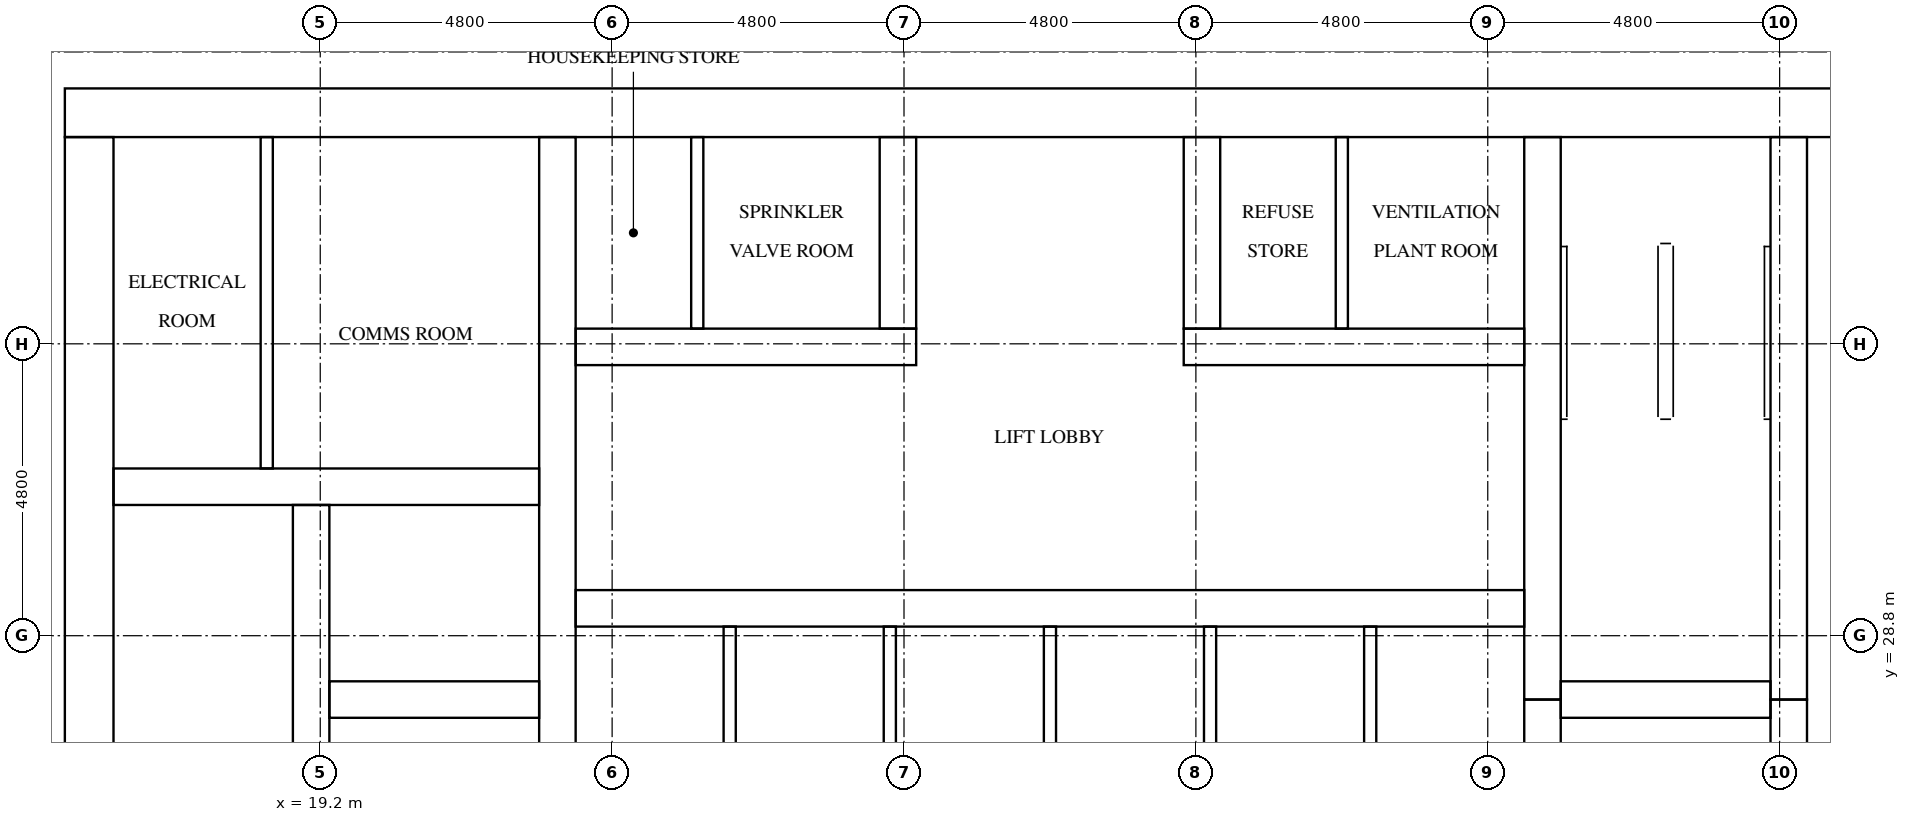
"""IFC4 building model, lengths in metres.
Left out: names, types, materials, properties, quantities, classifications, styles, units other than length and angle.
Written with IfcOpenShell. Run it as: python <this file> out.ifc"""

import sys

from ifc_helpers import new_model, si_unit, direction, frame, frame_2d, origin, place, context, subcontext, project, spatial, rectangle, extrude, element, fill, save


model = new_model("IFC4")
c1 = context("Model", 3, precision=1e-05, world=origin(), true_north=direction((0.0, 1.0)))
c2 = subcontext(c1, "Body", "Model", "MODEL_VIEW")
j1 = project(units=[si_unit("LENGTHUNIT", "METRE"), si_unit("PLANEANGLEUNIT", "RADIAN")], contexts=[c1])
p1 = place(None, origin())
s1 = spatial("IfcSite", under=j1, at=p1, CompositionType="ELEMENT")
p2 = place(p1, origin())
s2 = spatial("IfcBuilding", under=s1, at=p2, CompositionType="ELEMENT")
p3 = place(p2, frame((0.0, 0.0, 156.0)))
s3 = spatial("IfcBuildingStorey", under=s2, at=p3, CompositionType="ELEMENT", Elevation=156.0)
p4 = place(p3, frame((15.0, 37.4, 0.0), z_axis=(0.0, 0.0, 1.0), x_axis=(1.0, 0.0, 0.0)))
e1 = element("IfcWall", 1, at=p4, inside=s3, PredefinedType="SHEAR", context=c2, shape_type="SweptSolid", body=[
    extrude(rectangle(XDim=32.4, YDim=0.8, at=frame_2d((16.2, 0.0))), origin(), (0.0, 0.0, 1.0), 3.2),
])
p5 = place(p4, frame((15.3, 0.0, 0.0)))
e2 = element("IfcOpeningElement", 2, at=p5, cuts=e1, PredefinedType="OPENING", context=c2, shape_type="SweptSolid", body=[
    extrude(rectangle(XDim=1.8, YDim=2.1, at=frame_2d((0.9, 1.05))), frame((0.0, 0.41, 0.0), z_axis=(0.0, -1.0, 0.0), x_axis=(1.0, 0.0, 0.0)), (0.0, 0.0, 1.0), 0.82),
])
p6 = place(p4, frame((1.51, 0.0, 0.0)))
e3 = element("IfcOpeningElement", 3, at=p6, cuts=e1, PredefinedType="OPENING", context=c2, shape_type="SweptSolid", body=[
    extrude(rectangle(XDim=1.0, YDim=2.1, at=frame_2d((0.5, 1.05))), frame((0.0, 0.41, 0.0), z_axis=(0.0, -1.0, 0.0), x_axis=(1.0, 0.0, 0.0)), (0.0, 0.0, 1.0), 0.82),
])
p7 = place(p4, frame((5.11, 0.0, 0.0)))
e4 = element("IfcOpeningElement", 4, at=p7, cuts=e1, PredefinedType="OPENING", context=c2, shape_type="SweptSolid", body=[
    extrude(rectangle(XDim=1.0, YDim=2.1, at=frame_2d((0.5, 1.05))), frame((0.0, 0.41, 0.0), z_axis=(0.0, -1.0, 0.0), x_axis=(1.0, 0.0, 0.0)), (0.0, 0.0, 1.0), 0.82),
])
p8 = place(p3, frame((15.4, 15.8, 0.0), z_axis=(0.0, 0.0, 1.0), x_axis=(0.0, 1.0, 0.0)))
e5 = element("IfcWall", 5, at=p8, inside=s3, PredefinedType="SHEAR", context=c2, shape_type="SweptSolid", body=[
    extrude(rectangle(XDim=21.2, YDim=0.8, at=frame_2d((10.6, 0.0))), origin(), (0.0, 0.0, 1.0), 3.2),
])
p9 = place(p8, frame((4.96, 0.0, 0.0)))
e6 = element("IfcOpeningElement", 6, at=p9, cuts=e5, PredefinedType="OPENING", context=c2, shape_type="SweptSolid", body=[
    extrude(rectangle(XDim=1.2, YDim=2.1, at=frame_2d((0.6, 1.05))), frame((0.0, 0.41, 0.0), z_axis=(0.0, -1.0, 0.0), x_axis=(1.0, 0.0, 0.0)), (0.0, 0.0, 1.0), 0.82),
])
p10 = place(p3, frame((19.05, 15.8, 0.0), z_axis=(0.0, 0.0, 1.0), x_axis=(0.0, 1.0, 0.0)))
e7 = element("IfcWall", 7, at=p10, inside=s3, PredefinedType="SHEAR", context=c2, shape_type="SweptSolid", body=[
    extrude(rectangle(XDim=15.15, YDim=0.6, at=frame_2d((7.575, 0.0))), origin(), (0.0, 0.0, 1.0), 3.2),
])
p11 = place(p10, frame((9.65, 0.0, 0.0)))
e8 = element("IfcOpeningElement", 8, at=p11, cuts=e7, PredefinedType="OPENING", context=c2, shape_type="SweptSolid", body=[
    extrude(rectangle(XDim=1.1, YDim=2.1, at=frame_2d((0.55, 1.05))), frame((0.0, 0.31, 0.0), z_axis=(0.0, -1.0, 0.0), x_axis=(1.0, 0.0, 0.0)), (0.0, 0.0, 1.0), 0.62),
])
p12 = place(p10, frame((13.15, 0.0, 0.0)))
e9 = element("IfcOpeningElement", 9, at=p12, cuts=e7, PredefinedType="OPENING", context=c2, shape_type="SweptSolid", body=[
    extrude(rectangle(XDim=1.1, YDim=2.1, at=frame_2d((0.55, 1.05))), frame((0.0, 0.31, 0.0), z_axis=(0.0, -1.0, 0.0), x_axis=(1.0, 0.0, 0.0)), (0.0, 0.0, 1.0), 0.62),
])
p13 = place(p10, frame((0.4, 0.0, 0.0)))
e10 = element("IfcOpeningElement", 10, at=p13, cuts=e7, PredefinedType="OPENING", context=c2, shape_type="SweptSolid", body=[
    extrude(rectangle(XDim=1.2, YDim=2.1, at=frame_2d((0.6, 1.05))), frame((0.0, 0.31, 0.0), z_axis=(0.0, -1.0, 0.0), x_axis=(1.0, 0.0, 0.0)), (0.0, 0.0, 1.0), 0.62),
])
p14 = place(p3, frame((23.1, 15.8, 0.0), z_axis=(0.0, 0.0, 1.0), x_axis=(0.0, 1.0, 0.0)))
e11 = element("IfcWall", 11, at=p14, inside=s3, PredefinedType="SHEAR", context=c2, shape_type="SweptSolid", body=[
    extrude(rectangle(XDim=21.2, YDim=0.6, at=frame_2d((10.6, 0.0))), origin(), (0.0, 0.0, 1.0), 3.2),
])
p15 = place(p3, frame((39.3, 24.25, 0.0), z_axis=(0.0, 0.0, 1.0), x_axis=(0.0, 1.0, 0.0)))
e12 = element("IfcWall", 12, at=p15, inside=s3, PredefinedType="SHEAR", context=c2, shape_type="SweptSolid", body=[
    extrude(rectangle(XDim=3.5, YDim=0.6, at=frame_2d((1.75, 0.0))), origin(), (0.0, 0.0, 1.0), 3.2),
])
p16 = place(p3, frame((39.3, 27.75, 0.0), z_axis=(0.0, 0.0, 1.0), x_axis=(0.0, 1.0, 0.0)))
e13 = element("IfcWall", 13, at=p16, inside=s3, PredefinedType="SHEAR", context=c2, shape_type="SweptSolid", body=[
    extrude(rectangle(XDim=9.25, YDim=0.6, at=frame_2d((4.625, 0.0))), origin(), (0.0, 0.0, 1.0), 3.2),
])
p17 = place(p3, frame((43.35, 24.25, 0.0), z_axis=(0.0, 0.0, 1.0), x_axis=(0.0, 1.0, 0.0)))
e14 = element("IfcWall", 14, at=p17, inside=s3, PredefinedType="SHEAR", context=c2, shape_type="SweptSolid", body=[
    extrude(rectangle(XDim=3.5, YDim=0.6, at=frame_2d((1.75, 0.0))), origin(), (0.0, 0.0, 1.0), 3.2),
])
p18 = place(p17, frame((1.2, 0.0, 0.0)))
e15 = element("IfcOpeningElement", 15, at=p18, cuts=e14, PredefinedType="OPENING", context=c2, shape_type="SweptSolid", body=[
    extrude(rectangle(XDim=1.1, YDim=2.1, at=frame_2d((0.55, 1.05))), frame((0.0, 0.31, 0.0), z_axis=(0.0, -1.0, 0.0), x_axis=(1.0, 0.0, 0.0)), (0.0, 0.0, 1.0), 0.62),
])
p19 = place(p3, frame((43.35, 27.75, 0.0), z_axis=(0.0, 0.0, 1.0), x_axis=(0.0, 1.0, 0.0)))
e16 = element("IfcWall", 16, at=p19, inside=s3, PredefinedType="SHEAR", context=c2, shape_type="SweptSolid", body=[
    extrude(rectangle(XDim=9.25, YDim=0.6, at=frame_2d((4.625, 0.0))), origin(), (0.0, 0.0, 1.0), 3.2),
])
p20 = place(p19, frame((7.65, 0.0, 0.0)))
e17 = element("IfcOpeningElement", 17, at=p20, cuts=e16, PredefinedType="OPENING", context=c2, shape_type="SweptSolid", body=[
    extrude(rectangle(XDim=1.2, YDim=2.1, at=frame_2d((0.6, 1.05))), frame((0.0, 0.31, 0.0), z_axis=(0.0, -1.0, 0.0), x_axis=(1.0, 0.0, 0.0)), (0.0, 0.0, 1.0), 0.62),
])
p21 = place(p3, frame((19.35, 27.75, 0.0), z_axis=(0.0, 0.0, 1.0), x_axis=(1.0, 0.0, 0.0)))
e18 = element("IfcWall", 18, at=p21, inside=s3, PredefinedType="SHEAR", context=c2, shape_type="SweptSolid", body=[
    extrude(rectangle(XDim=3.45, YDim=0.6, at=frame_2d((1.725, 0.0))), origin(), (0.0, 0.0, 1.0), 3.2),
])
p22 = place(p3, frame((15.8, 31.25, 0.0), z_axis=(0.0, 0.0, 1.0), x_axis=(1.0, 0.0, 0.0)))
e19 = element("IfcWall", 19, at=p22, inside=s3, PredefinedType="SHEAR", context=c2, shape_type="SweptSolid", body=[
    extrude(rectangle(XDim=7.0, YDim=0.6, at=frame_2d((3.5, 0.0))), origin(), (0.0, 0.0, 1.0), 3.2),
])
p23 = place(p3, frame((39.6, 27.75, 0.0), z_axis=(0.0, 0.0, 1.0), x_axis=(1.0, 0.0, 0.0)))
e20 = element("IfcWall", 20, at=p23, inside=s3, PredefinedType="SHEAR", context=c2, shape_type="SweptSolid", body=[
    extrude(rectangle(XDim=3.45, YDim=0.6, at=frame_2d((1.725, 0.0))), origin(), (0.0, 0.0, 1.0), 3.2),
])
p24 = place(p3, frame((23.4, 29.25, 0.0), z_axis=(0.0, 0.0, 1.0), x_axis=(1.0, 0.0, 0.0)))
e21 = element("IfcWall", 21, at=p24, inside=s3, PredefinedType="SHEAR", context=c2, shape_type="SweptSolid", body=[
    extrude(rectangle(XDim=15.6, YDim=0.6, at=frame_2d((7.8, 0.0))), origin(), (0.0, 0.0, 1.0), 3.2),
])
p25 = place(p24, frame((0.667, 0.0, 0.0)))
e22 = element("IfcOpeningElement", 22, at=p25, cuts=e21, PredefinedType="OPENING", context=c2, shape_type="SweptSolid", body=[
    extrude(rectangle(XDim=1.1, YDim=2.1, at=frame_2d((0.55, 1.05))), frame((0.0, 0.31, 0.0), z_axis=(0.0, -1.0, 0.0), x_axis=(1.0, 0.0, 0.0)), (0.0, 0.0, 1.0), 0.62),
])
p26 = place(p24, frame((3.3, 0.0, 0.0)))
e23 = element("IfcOpeningElement", 23, at=p26, cuts=e21, PredefinedType="OPENING", context=c2, shape_type="SweptSolid", body=[
    extrude(rectangle(XDim=1.1, YDim=2.1, at=frame_2d((0.55, 1.05))), frame((0.0, 0.31, 0.0), z_axis=(0.0, -1.0, 0.0), x_axis=(1.0, 0.0, 0.0)), (0.0, 0.0, 1.0), 0.62),
])
p27 = place(p24, frame((5.933, 0.0, 0.0)))
e24 = element("IfcOpeningElement", 24, at=p27, cuts=e21, PredefinedType="OPENING", context=c2, shape_type="SweptSolid", body=[
    extrude(rectangle(XDim=1.1, YDim=2.1, at=frame_2d((0.55, 1.05))), frame((0.0, 0.31, 0.0), z_axis=(0.0, -1.0, 0.0), x_axis=(1.0, 0.0, 0.0)), (0.0, 0.0, 1.0), 0.62),
])
p28 = place(p24, frame((8.567, 0.0, 0.0)))
e25 = element("IfcOpeningElement", 25, at=p28, cuts=e21, PredefinedType="OPENING", context=c2, shape_type="SweptSolid", body=[
    extrude(rectangle(XDim=1.1, YDim=2.1, at=frame_2d((0.55, 1.05))), frame((0.0, 0.31, 0.0), z_axis=(0.0, -1.0, 0.0), x_axis=(1.0, 0.0, 0.0)), (0.0, 0.0, 1.0), 0.62),
])
p29 = place(p24, frame((11.2, 0.0, 0.0)))
e26 = element("IfcOpeningElement", 26, at=p29, cuts=e21, PredefinedType="OPENING", context=c2, shape_type="SweptSolid", body=[
    extrude(rectangle(XDim=1.1, YDim=2.1, at=frame_2d((0.55, 1.05))), frame((0.0, 0.31, 0.0), z_axis=(0.0, -1.0, 0.0), x_axis=(1.0, 0.0, 0.0)), (0.0, 0.0, 1.0), 0.62),
])
p30 = place(p24, frame((13.833, 0.0, 0.0)))
e27 = element("IfcOpeningElement", 27, at=p30, cuts=e21, PredefinedType="OPENING", context=c2, shape_type="SweptSolid", body=[
    extrude(rectangle(XDim=1.1, YDim=2.1, at=frame_2d((0.55, 1.05))), frame((0.0, 0.31, 0.0), z_axis=(0.0, -1.0, 0.0), x_axis=(1.0, 0.0, 0.0)), (0.0, 0.0, 1.0), 0.62),
])
p31 = place(p3, frame((23.4, 33.55, 0.0), z_axis=(0.0, 0.0, 1.0), x_axis=(1.0, 0.0, 0.0)))
e28 = element("IfcWall", 28, at=p31, inside=s3, PredefinedType="SHEAR", context=c2, shape_type="SweptSolid", body=[
    extrude(rectangle(XDim=5.6, YDim=0.6, at=frame_2d((2.8, 0.0))), origin(), (0.0, 0.0, 1.0), 3.2),
])
p32 = place(p31, frame((0.45, 0.0, 0.0)))
e29 = element("IfcOpeningElement", 29, at=p32, cuts=e28, PredefinedType="OPENING", context=c2, shape_type="SweptSolid", body=[
    extrude(rectangle(XDim=1.0, YDim=2.1, at=frame_2d((0.5, 1.05))), frame((0.0, 0.31, 0.0), z_axis=(0.0, -1.0, 0.0), x_axis=(1.0, 0.0, 0.0)), (0.0, 0.0, 1.0), 0.62),
])
p33 = place(p31, frame((3.05, 0.0, 0.0)))
e30 = element("IfcOpeningElement", 30, at=p33, cuts=e28, PredefinedType="OPENING", context=c2, shape_type="SweptSolid", body=[
    extrude(rectangle(XDim=1.0, YDim=2.1, at=frame_2d((0.5, 1.05))), frame((0.0, 0.31, 0.0), z_axis=(0.0, -1.0, 0.0), x_axis=(1.0, 0.0, 0.0)), (0.0, 0.0, 1.0), 0.62),
])
p34 = place(p3, frame((33.4, 33.55, 0.0), z_axis=(0.0, 0.0, 1.0), x_axis=(1.0, 0.0, 0.0)))
e31 = element("IfcWall", 31, at=p34, inside=s3, PredefinedType="SHEAR", context=c2, shape_type="SweptSolid", body=[
    extrude(rectangle(XDim=5.6, YDim=0.6, at=frame_2d((2.8, 0.0))), origin(), (0.0, 0.0, 1.0), 3.2),
])
p35 = place(p34, frame((1.05, 0.0, 0.0)))
e32 = element("IfcOpeningElement", 32, at=p35, cuts=e31, PredefinedType="OPENING", context=c2, shape_type="SweptSolid", body=[
    extrude(rectangle(XDim=1.0, YDim=2.1, at=frame_2d((0.5, 1.05))), frame((0.0, 0.31, 0.0), z_axis=(0.0, -1.0, 0.0), x_axis=(1.0, 0.0, 0.0)), (0.0, 0.0, 1.0), 0.62),
])
p36 = place(p34, frame((3.65, 0.0, 0.0)))
e33 = element("IfcOpeningElement", 33, at=p36, cuts=e31, PredefinedType="OPENING", context=c2, shape_type="SweptSolid", body=[
    extrude(rectangle(XDim=1.0, YDim=2.1, at=frame_2d((0.5, 1.05))), frame((0.0, 0.31, 0.0), z_axis=(0.0, -1.0, 0.0), x_axis=(1.0, 0.0, 0.0)), (0.0, 0.0, 1.0), 0.62),
])
for number, where, z_axis, x_axis in (
    (34, (28.7, 33.85, 0.0), (0.0, 0.0, 1.0), (0.0, 1.0, 0.0)),
    (35, (33.7, 33.85, 0.0), (0.0, 0.0, 1.0), (0.0, 1.0, 0.0)),
):
    element("IfcWall", number, at=place(p3, frame(where, z_axis=z_axis, x_axis=x_axis)), inside=s3, PredefinedType="SHEAR", context=c2, shape_type="SweptSolid", body=[
        extrude(rectangle(XDim=3.15, YDim=0.6, at=frame_2d((1.575, 0.0))), origin(), (0.0, 0.0, 1.0), 3.2),
    ])
for number, where, z_axis, x_axis in (
    (36, (25.933, 26.45, 0.0), (0.0, 0.0, 1.0), (0.0, 1.0, 0.0)),
    (37, (28.567, 26.45, 0.0), (0.0, 0.0, 1.0), (0.0, 1.0, 0.0)),
    (38, (31.2, 26.45, 0.0), (0.0, 0.0, 1.0), (0.0, 1.0, 0.0)),
    (39, (33.833, 26.45, 0.0), (0.0, 0.0, 1.0), (0.0, 1.0, 0.0)),
    (40, (36.467, 26.45, 0.0), (0.0, 0.0, 1.0), (0.0, 1.0, 0.0)),
):
    element("IfcWall", number, at=place(p3, frame(where, z_axis=z_axis, x_axis=x_axis)), inside=s3, PredefinedType="SOLIDWALL", context=c2, shape_type="SweptSolid", body=[
        extrude(rectangle(XDim=2.5, YDim=0.2, at=frame_2d((1.25, 0.0))), origin(), (0.0, 0.0, 1.0), 3.2),
    ])
p37 = place(p3, frame((18.32, 31.55, 0.0), z_axis=(0.0, 0.0, 1.0), x_axis=(0.0, 1.0, 0.0)))
e41 = element("IfcWall", 41, at=p37, inside=s3, PredefinedType="PARTITIONING", context=c2, shape_type="SweptSolid", body=[
    extrude(rectangle(XDim=5.45, YDim=0.2, at=frame_2d((2.725, 0.0))), origin(), (0.0, 0.0, 1.0), 3.2),
])
for number, where, z_axis, x_axis in (
    (42, (25.4, 33.85, 0.0), (0.0, 0.0, 1.0), (0.0, 1.0, 0.0)),
    (43, (36.0, 33.85, 0.0), (0.0, 0.0, 1.0), (0.0, 1.0, 0.0)),
):
    element("IfcWall", number, at=place(p3, frame(where, z_axis=z_axis, x_axis=x_axis)), inside=s3, PredefinedType="PARTITIONING", context=c2, shape_type="SweptSolid", body=[
        extrude(rectangle(XDim=3.15, YDim=0.2, at=frame_2d((1.575, 0.0))), origin(), (0.0, 0.0, 1.0), 3.2),
    ])
p38 = place(p25, origin())
e44 = element("IfcDoor", 44, at=p38, inside=s3, OperationType="DOUBLE_DOOR_SLIDING", PredefinedType="DOOR", context=c2, shape_type="SweptSolid", body=[
    extrude(rectangle(XDim=1.1, YDim=2.1, at=frame_2d((0.55, 1.05))), frame((0.0, 0.025, 0.0), z_axis=(0.0, -1.0, 0.0), x_axis=(1.0, 0.0, 0.0)), (0.0, 0.0, 1.0), 0.05),
])
fill(e22, e44)
p39 = place(p26, origin())
e45 = element("IfcDoor", 45, at=p39, inside=s3, OperationType="DOUBLE_DOOR_SLIDING", PredefinedType="DOOR", context=c2, shape_type="SweptSolid", body=[
    extrude(rectangle(XDim=1.1, YDim=2.1, at=frame_2d((0.55, 1.05))), frame((0.0, 0.025, 0.0), z_axis=(0.0, -1.0, 0.0), x_axis=(1.0, 0.0, 0.0)), (0.0, 0.0, 1.0), 0.05),
])
fill(e23, e45)
p40 = place(p27, origin())
e46 = element("IfcDoor", 46, at=p40, inside=s3, OperationType="DOUBLE_DOOR_SLIDING", PredefinedType="DOOR", context=c2, shape_type="SweptSolid", body=[
    extrude(rectangle(XDim=1.1, YDim=2.1, at=frame_2d((0.55, 1.05))), frame((0.0, 0.025, 0.0), z_axis=(0.0, -1.0, 0.0), x_axis=(1.0, 0.0, 0.0)), (0.0, 0.0, 1.0), 0.05),
])
fill(e24, e46)
p41 = place(p28, origin())
e47 = element("IfcDoor", 47, at=p41, inside=s3, OperationType="DOUBLE_DOOR_SLIDING", PredefinedType="DOOR", context=c2, shape_type="SweptSolid", body=[
    extrude(rectangle(XDim=1.1, YDim=2.1, at=frame_2d((0.55, 1.05))), frame((0.0, 0.025, 0.0), z_axis=(0.0, -1.0, 0.0), x_axis=(1.0, 0.0, 0.0)), (0.0, 0.0, 1.0), 0.05),
])
fill(e25, e47)
p42 = place(p29, origin())
e48 = element("IfcDoor", 48, at=p42, inside=s3, OperationType="DOUBLE_DOOR_SLIDING", PredefinedType="DOOR", context=c2, shape_type="SweptSolid", body=[
    extrude(rectangle(XDim=1.1, YDim=2.1, at=frame_2d((0.55, 1.05))), frame((0.0, 0.025, 0.0), z_axis=(0.0, -1.0, 0.0), x_axis=(1.0, 0.0, 0.0)), (0.0, 0.0, 1.0), 0.05),
])
fill(e26, e48)
p43 = place(p30, origin())
e49 = element("IfcDoor", 49, at=p43, inside=s3, OperationType="DOUBLE_DOOR_SLIDING", PredefinedType="DOOR", context=c2, shape_type="SweptSolid", body=[
    extrude(rectangle(XDim=1.1, YDim=2.1, at=frame_2d((0.55, 1.05))), frame((0.0, 0.025, 0.0), z_axis=(0.0, -1.0, 0.0), x_axis=(1.0, 0.0, 0.0)), (0.0, 0.0, 1.0), 0.05),
])
fill(e27, e49)
p44 = place(p12, origin())
e50 = element("IfcDoor", 50, at=p44, inside=s3, OperationType="DOUBLE_DOOR_SLIDING", PredefinedType="DOOR", context=c2, shape_type="SweptSolid", body=[
    extrude(rectangle(XDim=1.1, YDim=2.1, at=frame_2d((0.55, 1.05))), frame((0.0, 0.025, 0.0), z_axis=(0.0, -1.0, 0.0), x_axis=(1.0, 0.0, 0.0)), (0.0, 0.0, 1.0), 0.05),
])
fill(e9, e50)
p45 = place(p20, origin())
e51 = element("IfcDoor", 51, at=p45, inside=s3, OperationType="SINGLE_SWING_RIGHT", PredefinedType="DOOR", context=c2, shape_type="SweptSolid", body=[
    extrude(rectangle(XDim=1.2, YDim=2.1, at=frame_2d((0.6, 1.05))), frame((0.0, 0.025, 0.0), z_axis=(0.0, -1.0, 0.0), x_axis=(1.0, 0.0, 0.0)), (0.0, 0.0, 1.0), 0.05),
])
fill(e17, e51)
p46 = place(p5, origin())
e52 = element("IfcDoor", 52, at=p46, inside=s3, OperationType="DOUBLE_DOOR_SINGLE_SWING", PredefinedType="DOOR", context=c2, shape_type="SweptSolid", body=[
    extrude(rectangle(XDim=1.8, YDim=2.1, at=frame_2d((0.9, 1.05))), frame((0.0, 0.025, 0.0), z_axis=(0.0, -1.0, 0.0), x_axis=(1.0, 0.0, 0.0)), (0.0, 0.0, 1.0), 0.05),
])
fill(e2, e52)
p47 = place(p6, origin())
e53 = element("IfcDoor", 53, at=p47, inside=s3, OperationType="SINGLE_SWING_LEFT", PredefinedType="DOOR", context=c2, shape_type="SweptSolid", body=[
    extrude(rectangle(XDim=1.0, YDim=2.1, at=frame_2d((0.5, 1.05))), frame((0.0, 0.025, 0.0), z_axis=(0.0, -1.0, 0.0), x_axis=(1.0, 0.0, 0.0)), (0.0, 0.0, 1.0), 0.05),
])
fill(e3, e53)
p48 = place(p7, origin())
e54 = element("IfcDoor", 54, at=p48, inside=s3, OperationType="SINGLE_SWING_RIGHT", PredefinedType="DOOR", context=c2, shape_type="SweptSolid", body=[
    extrude(rectangle(XDim=1.0, YDim=2.1, at=frame_2d((0.5, 1.05))), frame((0.0, 0.025, 0.0), z_axis=(0.0, -1.0, 0.0), x_axis=(1.0, 0.0, 0.0)), (0.0, 0.0, 1.0), 0.05),
])
fill(e4, e54)
p49 = place(p32, frame((1.0, 0.0, 0.0), z_axis=(0.0, 0.0, 1.0), x_axis=(-1.0, 0.0, 0.0)))
e55 = element("IfcDoor", 55, at=p49, inside=s3, OperationType="SINGLE_SWING_LEFT", PredefinedType="DOOR", context=c2, shape_type="SweptSolid", body=[
    extrude(rectangle(XDim=1.0, YDim=2.1, at=frame_2d((0.5, 1.05))), frame((0.0, 0.025, 0.0), z_axis=(0.0, -1.0, 0.0), x_axis=(1.0, 0.0, 0.0)), (0.0, 0.0, 1.0), 0.05),
])
fill(e29, e55)
p50 = place(p33, frame((1.0, 0.0, 0.0), z_axis=(0.0, 0.0, 1.0), x_axis=(-1.0, 0.0, 0.0)))
e56 = element("IfcDoor", 56, at=p50, inside=s3, OperationType="SINGLE_SWING_RIGHT", PredefinedType="DOOR", context=c2, shape_type="SweptSolid", body=[
    extrude(rectangle(XDim=1.0, YDim=2.1, at=frame_2d((0.5, 1.05))), frame((0.0, 0.025, 0.0), z_axis=(0.0, -1.0, 0.0), x_axis=(1.0, 0.0, 0.0)), (0.0, 0.0, 1.0), 0.05),
])
fill(e30, e56)
p51 = place(p35, frame((1.0, 0.0, 0.0), z_axis=(0.0, 0.0, 1.0), x_axis=(-1.0, 0.0, 0.0)))
e57 = element("IfcDoor", 57, at=p51, inside=s3, OperationType="SINGLE_SWING_LEFT", PredefinedType="DOOR", context=c2, shape_type="SweptSolid", body=[
    extrude(rectangle(XDim=1.0, YDim=2.1, at=frame_2d((0.5, 1.05))), frame((0.0, 0.025, 0.0), z_axis=(0.0, -1.0, 0.0), x_axis=(1.0, 0.0, 0.0)), (0.0, 0.0, 1.0), 0.05),
])
fill(e32, e57)
p52 = place(p36, frame((1.0, 0.0, 0.0), z_axis=(0.0, 0.0, 1.0), x_axis=(-1.0, 0.0, 0.0)))
e58 = element("IfcDoor", 58, at=p52, inside=s3, OperationType="SINGLE_SWING_RIGHT", PredefinedType="DOOR", context=c2, shape_type="SweptSolid", body=[
    extrude(rectangle(XDim=1.0, YDim=2.1, at=frame_2d((0.5, 1.05))), frame((0.0, 0.025, 0.0), z_axis=(0.0, -1.0, 0.0), x_axis=(1.0, 0.0, 0.0)), (0.0, 0.0, 1.0), 0.05),
])
fill(e33, e58)
save(model, sys.argv[1])
